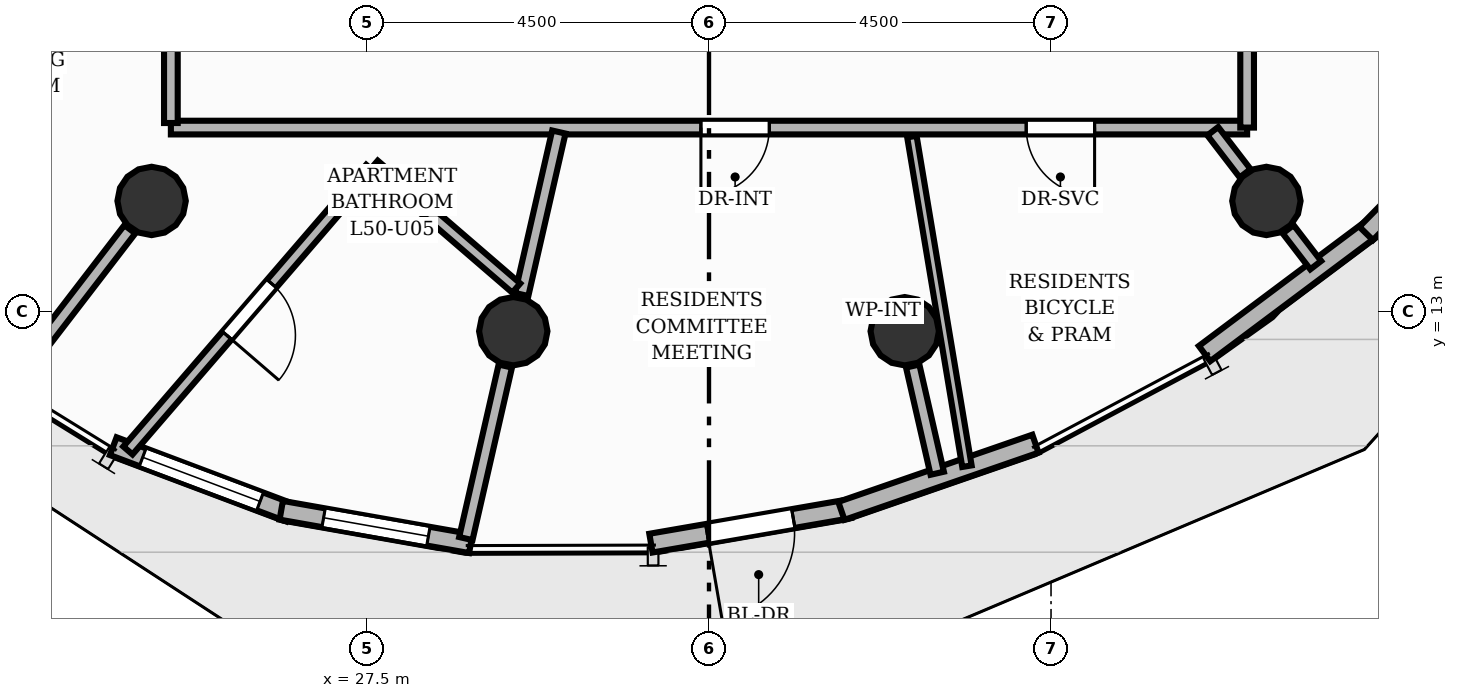
"""IFC4 building model, lengths in metres.
Left out: names, types, materials, properties, quantities, classifications, styles, units other than length and angle.
Written with IfcOpenShell. Run it as: python <this file> out.ifc"""

import sys

from ifc_helpers import new_model, si_unit, direction, frame, frame_2d, origin, origin_2d, place, context, subcontext, project, spatial, rectangle, circle, extrude, element, fill, save


model = new_model("IFC4")
c1 = context("Model", 3, precision=1e-05, world=origin(), true_north=direction((0.0, 1.0)))
c2 = subcontext(c1, "Body", "Model", "MODEL_VIEW")
j1 = project(units=[si_unit("LENGTHUNIT", "METRE"), si_unit("PLANEANGLEUNIT", "RADIAN")], contexts=[c1])
p1 = place(None, origin())
s1 = spatial("IfcSite", under=j1, at=p1, CompositionType="ELEMENT")
p2 = place(p1, origin())
s2 = spatial("IfcBuilding", under=s1, at=p2, CompositionType="ELEMENT")
p3 = place(p2, frame((0.0, 0.0, 169.44)))
s3 = spatial("IfcBuildingStorey", under=s2, at=p3, CompositionType="ELEMENT", Elevation=169.44)
for number, where, z_axis, x_axis in (
    (1, (24.667, 14.455, 0.0), (0.0, 0.0, 1.0), (1.0, 0.0, 0.0)),
    (2, (29.425, 12.74, 0.0), (0.0, 0.0, 1.0), (1.0, 0.0, 0.0)),
    (3, (34.575, 12.74, 0.0), (0.0, 0.0, 1.0), (1.0, 0.0, 0.0)),
    (4, (39.333, 14.455, 0.0), (0.0, 0.0, 1.0), (1.0, 0.0, 0.0)),
):
    element("IfcColumn", number, at=place(p3, frame(where, z_axis=z_axis, x_axis=x_axis)), inside=s3, PredefinedType="COLUMN", context=c2, shape_type="SweptSolid", body=[
        extrude(circle(Radius=0.45, at=origin_2d()), origin(), (0.0, 0.0, 1.0), 3.2),
    ])
p4 = place(p3, frame((26.481, 10.355, 0.0), z_axis=(0.0, 0.0, 1.0), x_axis=(-0.93586674787, 0.352354126172, 0.0)))
e5 = element("IfcWall", 5, at=p4, inside=s3, PredefinedType="SOLIDWALL", context=c2, shape_type="SweptSolid", body=[
    extrude(rectangle(XDim=2.478, YDim=0.25, at=frame_2d((1.239, 0.0))), origin(), (0.0, 0.0, 1.0), 2.96),
])
p5 = place(p4, frame((0.414, 0.0, 0.85)))
e6 = element("IfcOpeningElement", 6, at=p5, cuts=e5, PredefinedType="OPENING", context=c2, shape_type="SweptSolid", body=[
    extrude(rectangle(XDim=1.65, YDim=1.55, at=frame_2d((0.825, 0.775))), frame((0.0, 0.135, 0.0), z_axis=(0.0, -1.0, 0.0), x_axis=(1.0, 0.0, 0.0)), (0.0, 0.0, 1.0), 0.27),
])
p6 = place(p3, frame((28.865, 9.945, 0.0), z_axis=(0.0, 0.0, 1.0), x_axis=(-0.984837873762, 0.173477267688, 0.0)))
e7 = element("IfcWall", 7, at=p6, inside=s3, PredefinedType="SOLIDWALL", context=c2, shape_type="SweptSolid", body=[
    extrude(rectangle(XDim=2.532, YDim=0.25, at=frame_2d((1.266, 0.0))), origin(), (0.0, 0.0, 1.0), 2.96),
])
p7 = place(p6, frame((0.566, 0.0, 0.85)))
e8 = element("IfcOpeningElement", 8, at=p7, cuts=e7, PredefinedType="OPENING", context=c2, shape_type="SweptSolid", body=[
    extrude(rectangle(XDim=1.4, YDim=1.55, at=frame_2d((0.7, 0.775))), frame((0.0, 0.135, 0.0), z_axis=(0.0, -1.0, 0.0), x_axis=(1.0, 0.0, 0.0)), (0.0, 0.0, 1.0), 0.27),
])
p8 = place(p3, frame((33.848, 10.405, 0.0), z_axis=(0.0, 0.0, 1.0), x_axis=(-0.985331154473, -0.170653203967, 0.0)))
e9 = element("IfcWall", 9, at=p8, inside=s3, PredefinedType="SOLIDWALL", context=c2, shape_type="SweptSolid", body=[
    extrude(rectangle(XDim=2.651, YDim=0.25, at=frame_2d((1.325, 0.0))), origin(), (0.0, 0.0, 1.0), 2.96),
])
p9 = place(p8, frame((0.75, 0.0, 0.0)))
e10 = element("IfcOpeningElement", 10, at=p9, cuts=e9, PredefinedType="OPENING", context=c2, shape_type="SweptSolid", body=[
    extrude(rectangle(XDim=1.15, YDim=2.2, at=frame_2d((0.575, 1.1))), frame((0.0, 0.135, 0.0), z_axis=(0.0, -1.0, 0.0), x_axis=(1.0, 0.0, 0.0)), (0.0, 0.0, 1.0), 0.27),
])
p10 = place(p3, frame((36.295, 11.261, 0.0), z_axis=(0.0, 0.0, 1.0), x_axis=(-0.945016150651, -0.327023661236, 0.0)))
e11 = element("IfcWall", 11, at=p10, inside=s3, PredefinedType="SOLIDWALL", context=c2, shape_type="SweptSolid", body=[
    extrude(rectangle(XDim=2.702, YDim=0.25, at=frame_2d((1.351, 0.0))), origin(), (0.0, 0.0, 1.0), 2.96),
])
p11 = place(p3, frame((40.728, 14.099, 0.0), z_axis=(0.0, 0.0, 1.0), x_axis=(-0.800636941996, -0.599149803564, 0.0)))
e12 = element("IfcWall", 12, at=p11, inside=s3, PredefinedType="SOLIDWALL", context=c2, shape_type="SweptSolid", body=[
    extrude(rectangle(XDim=2.758, YDim=0.25, at=frame_2d((1.379, 0.0))), origin(), (0.0, 0.0, 1.0), 2.96),
])
p12 = place(p3, frame((42.579, 15.995, 0.0), z_axis=(0.0, 0.0, 1.0), x_axis=(-0.700794099323, -0.713363603189, 0.0)))
e13 = element("IfcWall", 13, at=p12, inside=s3, PredefinedType="SOLIDWALL", context=c2, shape_type="SweptSolid", body=[
    extrude(rectangle(XDim=2.758, YDim=0.25, at=frame_2d((1.379, 0.0))), origin(), (0.0, 0.0, 1.0), 2.96),
])
p13 = place(p12, frame((0.554, 0.0, 0.85)))
e14 = element("IfcOpeningElement", 14, at=p13, cuts=e13, PredefinedType="OPENING", context=c2, shape_type="SweptSolid", body=[
    extrude(rectangle(XDim=1.65, YDim=1.55, at=frame_2d((0.825, 0.775))), frame((0.0, 0.135, 0.0), z_axis=(0.0, -1.0, 0.0), x_axis=(1.0, 0.0, 0.0)), (0.0, 0.0, 1.0), 0.27),
])
p14 = place(p3, frame((24.38, 14.082, 0.0), z_axis=(0.0, 0.0, 1.0), x_axis=(-0.609279402228, -0.792955616678, 0.0)))
e15 = element("IfcWall", 15, at=p14, inside=s3, PredefinedType="PARTITIONING", context=c2, shape_type="SweptSolid", body=[
    extrude(rectangle(XDim=2.49, YDim=0.18, at=frame_2d((1.245, 0.0))), origin(), (0.0, 0.0, 1.0), 2.404),
])
p15 = place(p3, frame((29.32, 12.282, 0.0), z_axis=(0.0, 0.0, 1.0), x_axis=(-0.222998449778, -0.974818799263, 0.0)))
e16 = element("IfcWall", 16, at=p15, inside=s3, PredefinedType="PARTITIONING", context=c2, shape_type="SweptSolid", body=[
    extrude(rectangle(XDim=2.329, YDim=0.18, at=frame_2d((1.164, 0.0))), origin(), (0.0, 0.0, 1.0), 2.404),
])
p16 = place(p3, frame((34.68, 12.282, 0.0), z_axis=(0.0, 0.0, 1.0), x_axis=(0.22299884629, -0.974818708557, 0.0)))
e17 = element("IfcWall", 17, at=p16, inside=s3, PredefinedType="PARTITIONING", context=c2, shape_type="SweptSolid", body=[
    extrude(rectangle(XDim=1.447, YDim=0.18, at=frame_2d((0.724, 0.0))), origin(), (0.0, 0.0, 1.0), 2.404),
])
p17 = place(p3, frame((39.62, 14.082, 0.0), z_axis=(0.0, 0.0, 1.0), x_axis=(0.609274747308, -0.792959193334, 0.0)))
e18 = element("IfcWall", 18, at=p17, inside=s3, PredefinedType="PARTITIONING", context=c2, shape_type="SweptSolid", body=[
    extrude(rectangle(XDim=0.595, YDim=0.18, at=frame_2d((0.298, 0.0))), origin(), (0.0, 0.0, 1.0), 2.404),
])
p18 = place(p3, frame((39.08, 15.42, 0.0), z_axis=(0.0, 0.0, 1.0), x_axis=(-1.0, 0.0, 0.0)))
e19 = element("IfcWall", 19, at=p18, inside=s3, PredefinedType="PARTITIONING", context=c2, shape_type="SweptSolid", body=[
    extrude(rectangle(XDim=14.16, YDim=0.18, at=frame_2d((7.08, 0.0))), origin(), (0.0, 0.0, 1.0), 2.955),
])
p19 = place(p18, frame((2.007, 0.0, 0.0)))
e20 = element("IfcOpeningElement", 20, at=p19, cuts=e19, PredefinedType="OPENING", context=c2, shape_type="SweptSolid", body=[
    extrude(rectangle(XDim=0.9, YDim=2.1, at=frame_2d((0.45, 1.05))), frame((0.0, 0.1, 0.0), z_axis=(0.0, -1.0, 0.0), x_axis=(1.0, 0.0, 0.0)), (0.0, 0.0, 1.0), 0.2),
])
p20 = place(p18, frame((6.287, 0.0, 0.0)))
e21 = element("IfcOpeningElement", 21, at=p20, cuts=e19, PredefinedType="OPENING", context=c2, shape_type="SweptSolid", body=[
    extrude(rectangle(XDim=0.9, YDim=2.1, at=frame_2d((0.45, 1.05))), frame((0.0, 0.1, 0.0), z_axis=(0.0, -1.0, 0.0), x_axis=(1.0, 0.0, 0.0)), (0.0, 0.0, 1.0), 0.2),
])
p21 = place(p3, frame((39.08, 30.248, 0.0), z_axis=(0.0, 0.0, 1.0), x_axis=(0.0, -1.0, 0.0)))
e22 = element("IfcWall", 22, at=p21, inside=s3, PredefinedType="PARTITIONING", context=c2, shape_type="SweptSolid", body=[
    extrude(rectangle(XDim=14.828, YDim=0.18, at=frame_2d((7.414, 0.0))), origin(), (0.0, 0.0, 1.0), 2.955),
])
p22 = place(p21, frame((6.351, 0.0, 0.0)))
e23 = element("IfcOpeningElement", 23, at=p22, cuts=e22, PredefinedType="OPENING", context=c2, shape_type="SweptSolid", body=[
    extrude(rectangle(XDim=1.05, YDim=2.15, at=frame_2d((0.525, 1.075))), frame((0.0, 0.1, 0.0), z_axis=(0.0, -1.0, 0.0), x_axis=(1.0, 0.0, 0.0)), (0.0, 0.0, 1.0), 0.2),
])
p23 = place(p3, frame((24.92, 15.48, 0.0), z_axis=(0.0, 0.0, 1.0), x_axis=(0.0, 1.0, 0.0)))
e24 = element("IfcWall", 24, at=p23, inside=s3, PredefinedType="PARTITIONING", context=c2, shape_type="SweptSolid", body=[
    extrude(rectangle(XDim=5.412, YDim=0.18, at=frame_2d((2.706, 0.0))), origin(), (0.0, 0.0, 1.0), 2.955),
])
p24 = place(p23, frame((2.181, 0.0, 0.0)))
e25 = element("IfcOpeningElement", 25, at=p24, cuts=e24, PredefinedType="OPENING", context=c2, shape_type="SweptSolid", body=[
    extrude(rectangle(XDim=1.05, YDim=2.15, at=frame_2d((0.525, 1.075))), frame((0.0, 0.1, 0.0), z_axis=(0.0, -1.0, 0.0), x_axis=(1.0, 0.0, 0.0)), (0.0, 0.0, 1.0), 0.2),
])
p25 = place(p3, frame((35.394, 10.965, 0.0), z_axis=(0.0, 0.0, 1.0), x_axis=(-0.164741128257, 0.986336839351, 0.0)))
e26 = element("IfcWall", 26, at=p25, inside=s3, PredefinedType="PARTITIONING", context=c2, shape_type="SweptSolid", body=[
    extrude(rectangle(XDim=4.397, YDim=0.125, at=frame_2d((2.198, 0.0))), origin(), (0.0, 0.0, 1.0), 2.955),
])
p26 = place(p3, frame((38.628, 15.372, 0.0), z_axis=(0.0, 0.0, 1.0), x_axis=(0.609304996033, -0.792935950635, 0.0)))
e27 = element("IfcWall", 27, at=p26, inside=s3, PredefinedType="PARTITIONING", context=c2, shape_type="SweptSolid", body=[
    extrude(rectangle(XDim=0.698, YDim=0.18, at=frame_2d((0.349, 0.0))), origin(), (0.0, 0.0, 1.0), 2.404),
])
p27 = place(p3, frame((29.535, 13.224, 0.0), z_axis=(0.0, 0.0, 1.0), x_axis=(0.222891307908, 0.97484330272, 0.0)))
e28 = element("IfcWall", 28, at=p27, inside=s3, PredefinedType="PARTITIONING", context=c2, shape_type="SweptSolid", body=[
    extrude(rectangle(XDim=2.193, YDim=0.18, at=frame_2d((1.096, 0.0))), origin(), (0.0, 0.0, 1.0), 2.404),
])
p28 = place(p3, frame((29.464, 13.309, 0.0), z_axis=(0.0, 0.0, 1.0), x_axis=(-0.757457065386, 0.652884977693, 0.0)))
e29 = element("IfcWall", 29, at=p28, inside=s3, PredefinedType="PLUMBINGWALL", context=c2, shape_type="SweptSolid", body=[
    extrude(rectangle(XDim=2.475, YDim=0.16, at=frame_2d((1.237, 0.0))), origin(), (0.0, 0.0, 1.0), 2.955),
])
p29 = place(p3, frame((27.55, 14.879, 0.0), z_axis=(0.0, 0.0, 1.0), x_axis=(-0.652871537105, -0.757468650201, 0.0)))
e30 = element("IfcWall", 30, at=p29, inside=s3, PredefinedType="PLUMBINGWALL", context=c2, shape_type="SweptSolid", body=[
    extrude(rectangle(XDim=4.895, YDim=0.16, at=frame_2d((2.447, 0.0))), origin(), (0.0, 0.0, 1.0), 2.955),
])
p30 = place(p29, frame((1.997, 0.0, 0.0)))
e31 = element("IfcOpeningElement", 31, at=p30, cuts=e30, PredefinedType="OPENING", context=c2, shape_type="SweptSolid", body=[
    extrude(rectangle(XDim=0.9, YDim=2.1, at=frame_2d((0.45, 1.05))), frame((0.0, 0.09, 0.0), z_axis=(0.0, -1.0, 0.0), x_axis=(1.0, 0.0, 0.0)), (0.0, 0.0, 1.0), 0.18),
])
p31 = place(p9, origin())
e32 = element("IfcDoor", 32, at=p31, inside=s3, OperationType="SINGLE_SWING_RIGHT", PredefinedType="DOOR", context=c2, shape_type="SweptSolid", body=[
    extrude(rectangle(XDim=1.15, YDim=2.2, at=frame_2d((0.575, 1.1))), frame((0.0, 0.025, 0.0), z_axis=(0.0, -1.0, 0.0), x_axis=(1.0, 0.0, 0.0)), (0.0, 0.0, 1.0), 0.05),
])
fill(e10, e32)
p32 = place(p5, origin())
e33 = element("IfcWindow", 33, at=p32, inside=s3, PartitioningType="SINGLE_PANEL", PredefinedType="WINDOW", context=c2, shape_type="SweptSolid", body=[
    extrude(rectangle(XDim=1.65, YDim=1.55, at=frame_2d((0.825, 0.775))), frame((0.0, 0.03, 0.0), z_axis=(0.0, -1.0, 0.0), x_axis=(1.0, 0.0, 0.0)), (0.0, 0.0, 1.0), 0.06),
])
fill(e6, e33)
p33 = place(p7, origin())
e34 = element("IfcWindow", 34, at=p33, inside=s3, PartitioningType="SINGLE_PANEL", PredefinedType="WINDOW", context=c2, shape_type="SweptSolid", body=[
    extrude(rectangle(XDim=1.4, YDim=1.55, at=frame_2d((0.7, 0.775))), frame((0.0, 0.03, 0.0), z_axis=(0.0, -1.0, 0.0), x_axis=(1.0, 0.0, 0.0)), (0.0, 0.0, 1.0), 0.06),
])
fill(e8, e34)
p34 = place(p19, origin())
e35 = element("IfcDoor", 35, at=p34, inside=s3, OperationType="SINGLE_SWING_LEFT", PredefinedType="DOOR", context=c2, shape_type="SweptSolid", body=[
    extrude(rectangle(XDim=0.9, YDim=2.1, at=frame_2d((0.45, 1.05))), frame((0.0, 0.025, 0.0), z_axis=(0.0, -1.0, 0.0), x_axis=(1.0, 0.0, 0.0)), (0.0, 0.0, 1.0), 0.05),
])
fill(e20, e35)
p35 = place(p20, origin())
e36 = element("IfcDoor", 36, at=p35, inside=s3, OperationType="SINGLE_SWING_RIGHT", PredefinedType="DOOR", context=c2, shape_type="SweptSolid", body=[
    extrude(rectangle(XDim=0.9, YDim=2.1, at=frame_2d((0.45, 1.05))), frame((0.0, 0.025, 0.0), z_axis=(0.0, -1.0, 0.0), x_axis=(1.0, 0.0, 0.0)), (0.0, 0.0, 1.0), 0.05),
])
fill(e21, e36)
p36 = place(p30, origin())
e37 = element("IfcDoor", 37, at=p36, inside=s3, OperationType="SINGLE_SWING_RIGHT", PredefinedType="DOOR", context=c2, shape_type="SweptSolid", body=[
    extrude(rectangle(XDim=0.9, YDim=2.1, at=frame_2d((0.45, 1.05))), frame((0.0, 0.025, 0.0), z_axis=(0.0, -1.0, 0.0), x_axis=(1.0, 0.0, 0.0)), (0.0, 0.0, 1.0), 0.05),
])
fill(e31, e37)
save(model, sys.argv[1])
